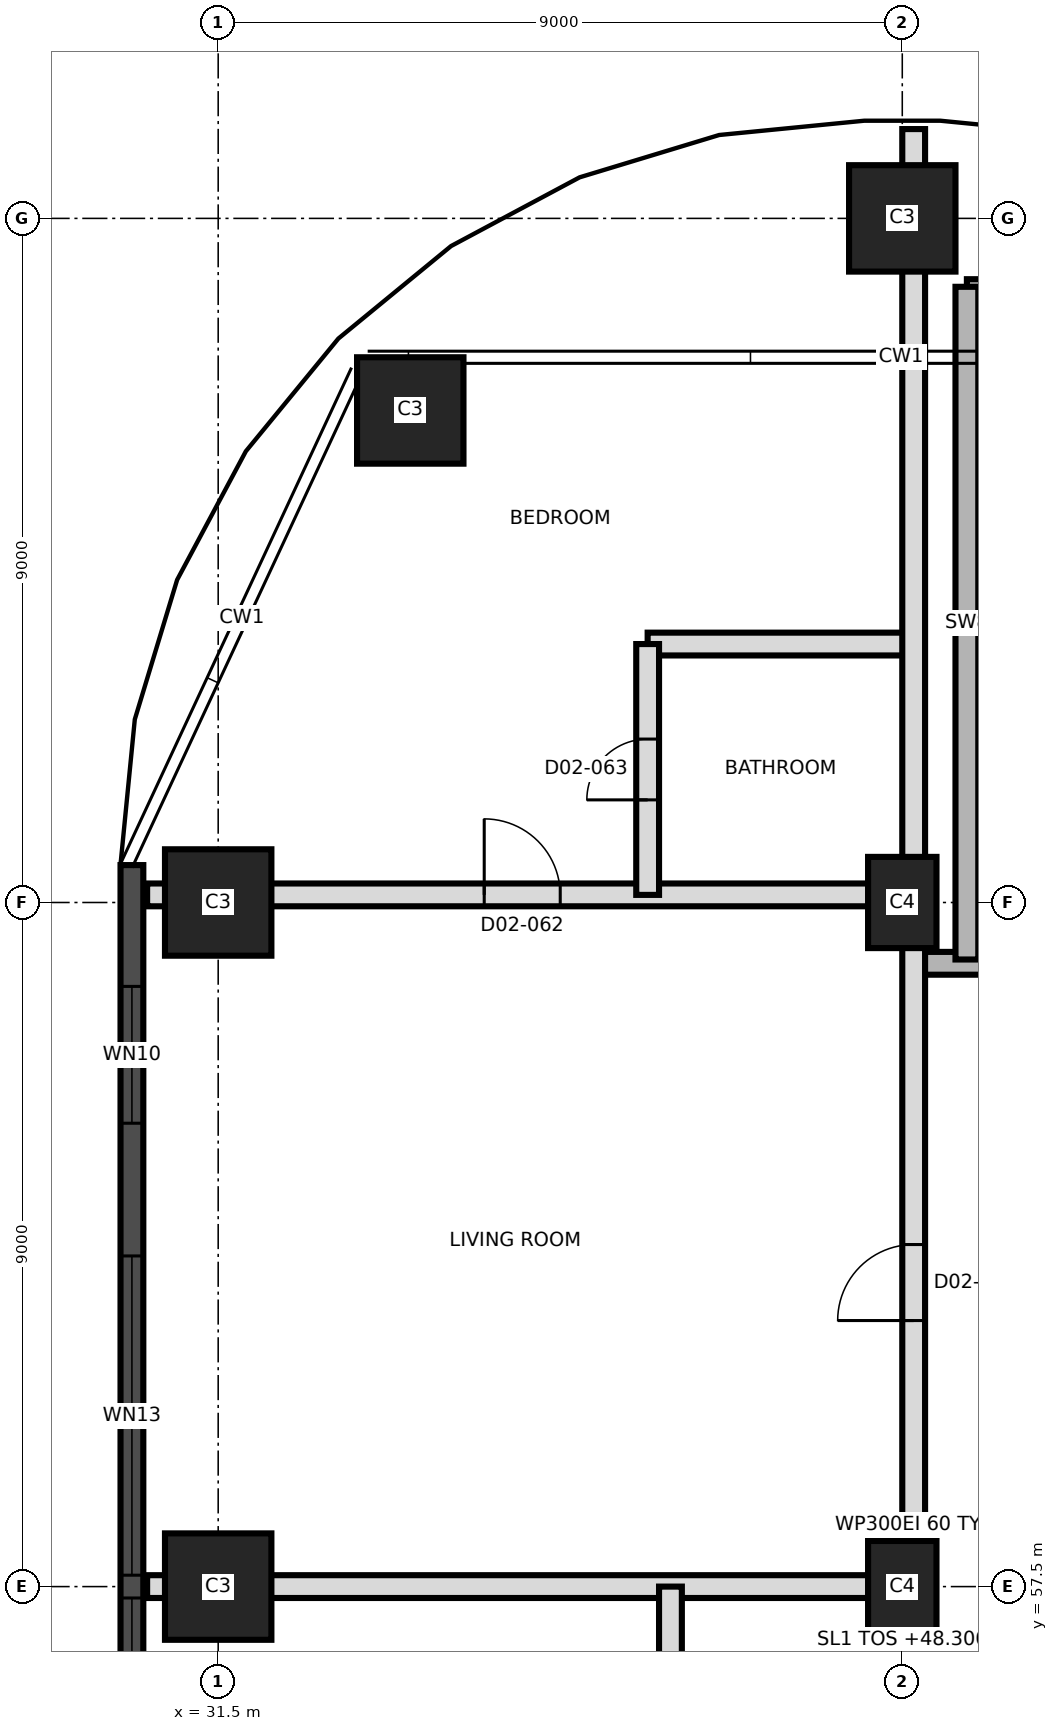
"""IFC4 building model, lengths in metres.
Left out: names, types, materials, properties, quantities, classifications, styles, units other than length and angle.
Written with IfcOpenShell. Run it as: python <this file> out.ifc"""

import sys

from ifc_helpers import new_model, si_unit, direction, frame, frame_2d, origin, origin_2d, place, context, subcontext, project, spatial, rectangle, extrude, element, fill, save


model = new_model("IFC4")
c1 = context("Model", 3, precision=1e-05, world=origin(), true_north=direction((0.0, 1.0)))
c2 = subcontext(c1, "Body", "Model", "MODEL_VIEW")
j1 = project(units=[si_unit("LENGTHUNIT", "METRE"), si_unit("PLANEANGLEUNIT", "RADIAN")], contexts=[c1])
p1 = place(None, origin())
s1 = spatial("IfcSite", under=j1, at=p1, CompositionType="ELEMENT")
p2 = place(p1, origin())
s2 = spatial("IfcBuilding", under=s1, at=p2, CompositionType="ELEMENT")
p3 = place(p2, frame((0.0, 0.0, 48.3)))
s3 = spatial("IfcBuildingStorey", under=s2, at=p3, CompositionType="ELEMENT", Elevation=48.3)
p4 = place(p3, frame((31.5, 57.5, 0.0), z_axis=(0.0, 0.0, 1.0), x_axis=(1.0, 0.0, 0.0)))
e1 = element("IfcColumn", 1, at=p4, inside=s3, PredefinedType="COLUMN", context=c2, shape_type="SweptSolid", body=[
    extrude(rectangle(XDim=1.4, YDim=1.4, at=origin_2d()), origin(), (0.0, 0.0, 1.0), 3.7),
])
p5 = place(p3, frame((40.5, 57.5, 0.0), z_axis=(0.0, 0.0, 1.0), x_axis=(0.0, 1.0, 0.0)))
e2 = element("IfcColumn", 2, at=p5, inside=s3, PredefinedType="COLUMN", context=c2, shape_type="SweptSolid", body=[
    extrude(rectangle(XDim=1.2, YDim=0.9, at=origin_2d()), origin(), (0.0, 0.0, 1.0), 3.7),
])
p6 = place(p3, frame((31.5, 66.5, 0.0), z_axis=(0.0, 0.0, 1.0), x_axis=(1.0, 0.0, 0.0)))
e3 = element("IfcColumn", 3, at=p6, inside=s3, PredefinedType="COLUMN", context=c2, shape_type="SweptSolid", body=[
    extrude(rectangle(XDim=1.4, YDim=1.4, at=origin_2d()), origin(), (0.0, 0.0, 1.0), 3.7),
])
p7 = place(p3, frame((40.5, 66.5, 0.0), z_axis=(0.0, 0.0, 1.0), x_axis=(0.0, 1.0, 0.0)))
e4 = element("IfcColumn", 4, at=p7, inside=s3, PredefinedType="COLUMN", context=c2, shape_type="SweptSolid", body=[
    extrude(rectangle(XDim=1.2, YDim=0.9, at=origin_2d()), origin(), (0.0, 0.0, 1.0), 3.7),
])
for number, where, z_axis, x_axis in (
    (5, (34.027, 72.973, 0.0), (0.0, 0.0, 1.0), (1.0, 0.0, 0.0)),
    (6, (40.5, 75.5, 0.0), (0.0, 0.0, 1.0), (1.0, 0.0, 0.0)),
):
    element("IfcColumn", number, at=place(p3, frame(where, z_axis=z_axis, x_axis=x_axis)), inside=s3, PredefinedType="COLUMN", context=c2, shape_type="SweptSolid", body=[
        extrude(rectangle(XDim=1.4, YDim=1.4, at=origin_2d()), origin(), (0.0, 0.0, 1.0), 3.7),
    ])
p8 = place(p3, frame((30.365, 66.992, 0.0), z_axis=(0.0, 0.0, 1.0), x_axis=(0.0, -1.0, 0.0)))
e7 = element("IfcWall", 7, at=p8, inside=s3, PredefinedType="SOLIDWALL", context=c2, shape_type="SweptSolid", body=[
    extrude(rectangle(XDim=32.981, YDim=0.3, at=frame_2d((16.491, 0.0))), origin(), (0.0, 0.0, 1.0), 3.4),
])
p9 = place(p8, frame((1.596, 0.0, 0.3)))
e8 = element("IfcOpeningElement", 8, at=p9, cuts=e7, PredefinedType="OPENING", context=c2, shape_type="SweptSolid", body=[
    extrude(rectangle(XDim=1.8, YDim=2.4, at=frame_2d((0.9, 1.2))), frame((0.0, 0.16, 0.0), z_axis=(0.0, -1.0, 0.0), x_axis=(1.0, 0.0, 0.0)), (0.0, 0.0, 1.0), 0.32),
])
p10 = place(p8, frame((5.142, 0.0, 0.9)))
e9 = element("IfcOpeningElement", 9, at=p10, cuts=e7, PredefinedType="OPENING", context=c2, shape_type="SweptSolid", body=[
    extrude(rectangle(XDim=4.2, YDim=1.7, at=frame_2d((2.1, 0.85))), frame((0.0, 0.16, 0.0), z_axis=(0.0, -1.0, 0.0), x_axis=(1.0, 0.0, 0.0)), (0.0, 0.0, 1.0), 0.32),
])
p11 = place(p8, frame((9.642, 0.0, 0.9)))
e10 = element("IfcOpeningElement", 10, at=p11, cuts=e7, PredefinedType="OPENING", context=c2, shape_type="SweptSolid", body=[
    extrude(rectangle(XDim=4.2, YDim=1.7, at=frame_2d((2.1, 0.85))), frame((0.0, 0.16, 0.0), z_axis=(0.0, -1.0, 0.0), x_axis=(1.0, 0.0, 0.0)), (0.0, 0.0, 1.0), 0.32),
])
p12 = place(p8, frame((14.142, 0.0, 0.9)))
e11 = element("IfcOpeningElement", 11, at=p12, cuts=e7, PredefinedType="OPENING", context=c2, shape_type="SweptSolid", body=[
    extrude(rectangle(XDim=4.2, YDim=1.7, at=frame_2d((2.1, 0.85))), frame((0.0, 0.16, 0.0), z_axis=(0.0, -1.0, 0.0), x_axis=(1.0, 0.0, 0.0)), (0.0, 0.0, 1.0), 0.32),
])
p13 = place(p8, frame((18.642, 0.0, 0.9)))
e12 = element("IfcOpeningElement", 12, at=p13, cuts=e7, PredefinedType="OPENING", context=c2, shape_type="SweptSolid", body=[
    extrude(rectangle(XDim=4.2, YDim=1.7, at=frame_2d((2.1, 0.85))), frame((0.0, 0.16, 0.0), z_axis=(0.0, -1.0, 0.0), x_axis=(1.0, 0.0, 0.0)), (0.0, 0.0, 1.0), 0.32),
])
p14 = place(p8, frame((23.142, 0.0, 0.9)))
e13 = element("IfcOpeningElement", 13, at=p14, cuts=e7, PredefinedType="OPENING", context=c2, shape_type="SweptSolid", body=[
    extrude(rectangle(XDim=4.2, YDim=1.7, at=frame_2d((2.1, 0.85))), frame((0.0, 0.16, 0.0), z_axis=(0.0, -1.0, 0.0), x_axis=(1.0, 0.0, 0.0)), (0.0, 0.0, 1.0), 0.32),
])
p15 = place(p8, frame((29.337, 0.0, 0.3)))
e14 = element("IfcOpeningElement", 14, at=p15, cuts=e7, PredefinedType="OPENING", context=c2, shape_type="SweptSolid", body=[
    extrude(rectangle(XDim=1.8, YDim=2.4, at=frame_2d((0.9, 1.2))), frame((0.0, 0.16, 0.0), z_axis=(0.0, -1.0, 0.0), x_axis=(1.0, 0.0, 0.0)), (0.0, 0.0, 1.0), 0.32),
])
p16 = place(p3, frame((30.565, 57.5, 0.0), z_axis=(0.0, 0.0, 1.0), x_axis=(1.0, 0.0, 0.0)))
e15 = element("IfcWall", 15, at=p16, inside=s3, PredefinedType="PARTITIONING", context=c2, shape_type="SweptSolid", body=[
    extrude(rectangle(XDim=10.085, YDim=0.3, at=frame_2d((5.042, 0.0))), origin(), (0.0, 0.0, 1.0), 3.4),
])
p17 = place(p3, frame((40.65, 65.7, 0.0), z_axis=(0.0, 0.0, 1.0), x_axis=(1.0, 0.0, 0.0)))
e16 = element("IfcWall", 16, at=p17, inside=s3, PredefinedType="SHEAR", context=c2, shape_type="SweptSolid", body=[
    extrude(rectangle(XDim=6.2, YDim=0.3, at=frame_2d((3.1, 0.0))), origin(), (0.0, 0.0, 1.0), 3.4),
])
p18 = place(p17, frame((1.1, 0.0, 0.0)))
e17 = element("IfcOpeningElement", 17, at=p18, cuts=e16, PredefinedType="OPENING", context=c2, shape_type="SweptSolid", body=[
    extrude(rectangle(XDim=1.2, YDim=2.1, at=frame_2d((0.6, 1.05))), frame((0.0, 0.16, 0.0), z_axis=(0.0, -1.0, 0.0), x_axis=(1.0, 0.0, 0.0)), (0.0, 0.0, 1.0), 0.32),
])
p19 = place(p3, frame((30.565, 66.6, 0.0), z_axis=(0.0, 0.0, 1.0), x_axis=(1.0, 0.0, 0.0)))
e18 = element("IfcWall", 18, at=p19, inside=s3, PredefinedType="PARTITIONING", context=c2, shape_type="SweptSolid", body=[
    extrude(rectangle(XDim=10.085, YDim=0.3, at=frame_2d((5.042, 0.0))), origin(), (0.0, 0.0, 1.0), 3.4),
])
p20 = place(p19, frame((4.435, 0.0, 0.0)))
e19 = element("IfcOpeningElement", 19, at=p20, cuts=e18, PredefinedType="OPENING", context=c2, shape_type="SweptSolid", body=[
    extrude(rectangle(XDim=1.0, YDim=2.1, at=frame_2d((0.5, 1.05))), frame((0.0, 0.16, 0.0), z_axis=(0.0, -1.0, 0.0), x_axis=(1.0, 0.0, 0.0)), (0.0, 0.0, 1.0), 0.32),
])
p21 = place(p3, frame((37.15, 69.9, 0.0), z_axis=(0.0, 0.0, 1.0), x_axis=(1.0, 0.0, 0.0)))
e20 = element("IfcWall", 20, at=p21, inside=s3, PredefinedType="PARTITIONING", context=c2, shape_type="SweptSolid", body=[
    extrude(rectangle(XDim=3.5, YDim=0.3, at=frame_2d((1.75, 0.0))), origin(), (0.0, 0.0, 1.0), 3.4),
])
p22 = place(p3, frame((41.35, 74.55, 0.0), z_axis=(0.0, 0.0, 1.0), x_axis=(1.0, 0.0, 0.0)))
e21 = element("IfcWall", 21, at=p22, inside=s3, PredefinedType="SHEAR", context=c2, shape_type="SweptSolid", body=[
    extrude(rectangle(XDim=3.0, YDim=0.3, at=frame_2d((1.5, 0.0))), origin(), (0.0, 0.0, 1.0), 3.4),
])
p23 = place(p3, frame((37.15, 66.6, 0.0), z_axis=(0.0, 0.0, 1.0), x_axis=(0.0, 1.0, 0.0)))
e22 = element("IfcWall", 22, at=p23, inside=s3, PredefinedType="PARTITIONING", context=c2, shape_type="SweptSolid", body=[
    extrude(rectangle(XDim=3.3, YDim=0.3, at=frame_2d((1.65, 0.0))), origin(), (0.0, 0.0, 1.0), 3.4),
])
p24 = place(p23, frame((1.25, 0.0, 0.0)))
e23 = element("IfcOpeningElement", 23, at=p24, cuts=e22, PredefinedType="OPENING", context=c2, shape_type="SweptSolid", body=[
    extrude(rectangle(XDim=0.8, YDim=2.1, at=frame_2d((0.4, 1.05))), frame((0.0, 0.16, 0.0), z_axis=(0.0, -1.0, 0.0), x_axis=(1.0, 0.0, 0.0)), (0.0, 0.0, 1.0), 0.32),
])
p25 = place(p3, frame((37.45, 54.8, 0.0), z_axis=(0.0, 0.0, 1.0), x_axis=(0.0, 1.0, 0.0)))
e24 = element("IfcWall", 24, at=p25, inside=s3, PredefinedType="PARTITIONING", context=c2, shape_type="SweptSolid", body=[
    extrude(rectangle(XDim=2.7, YDim=0.3, at=frame_2d((1.35, 0.0))), origin(), (0.0, 0.0, 1.0), 3.4),
])
p26 = place(p25, frame((0.95, 0.0, 0.0)))
e25 = element("IfcOpeningElement", 25, at=p26, cuts=e24, PredefinedType="OPENING", context=c2, shape_type="SweptSolid", body=[
    extrude(rectangle(XDim=0.8, YDim=2.1, at=frame_2d((0.4, 1.05))), frame((0.0, 0.16, 0.0), z_axis=(0.0, -1.0, 0.0), x_axis=(1.0, 0.0, 0.0)), (0.0, 0.0, 1.0), 0.32),
])
p27 = place(p3, frame((40.65, 39.95, 0.0), z_axis=(0.0, 0.0, 1.0), x_axis=(0.0, 1.0, 0.0)))
e26 = element("IfcWall", 26, at=p27, inside=s3, PredefinedType="PARTITIONING", context=c2, shape_type="SweptSolid", body=[
    extrude(rectangle(XDim=36.725, YDim=0.3, at=frame_2d((18.363, 0.0))), origin(), (0.0, 0.0, 1.0), 3.4),
])
p28 = place(p27, frame((0.685, 0.0, 0.0)))
e27 = element("IfcOpeningElement", 27, at=p28, cuts=e26, PredefinedType="OPENING", context=c2, shape_type="SweptSolid", body=[
    extrude(rectangle(XDim=1.2, YDim=2.1, at=frame_2d((0.6, 1.05))), frame((0.0, 0.16, 0.0), z_axis=(0.0, -1.0, 0.0), x_axis=(1.0, 0.0, 0.0)), (0.0, 0.0, 1.0), 0.32),
])
p29 = place(p27, frame((3.935, 0.0, 0.0)))
e28 = element("IfcOpeningElement", 28, at=p29, cuts=e26, PredefinedType="OPENING", context=c2, shape_type="SweptSolid", body=[
    extrude(rectangle(XDim=1.0, YDim=2.1, at=frame_2d((0.5, 1.05))), frame((0.0, 0.16, 0.0), z_axis=(0.0, -1.0, 0.0), x_axis=(1.0, 0.0, 0.0)), (0.0, 0.0, 1.0), 0.32),
])
p30 = place(p27, frame((11.83, 0.0, 0.0)))
e29 = element("IfcOpeningElement", 29, at=p30, cuts=e26, PredefinedType="OPENING", context=c2, shape_type="SweptSolid", body=[
    extrude(rectangle(XDim=1.0, YDim=2.1, at=frame_2d((0.5, 1.05))), frame((0.0, 0.16, 0.0), z_axis=(0.0, -1.0, 0.0), x_axis=(1.0, 0.0, 0.0)), (0.0, 0.0, 1.0), 0.32),
])
p31 = place(p27, frame((13.63, 0.0, 0.0)))
e30 = element("IfcOpeningElement", 30, at=p31, cuts=e26, PredefinedType="OPENING", context=c2, shape_type="SweptSolid", body=[
    extrude(rectangle(XDim=1.0, YDim=2.1, at=frame_2d((0.5, 1.05))), frame((0.0, 0.16, 0.0), z_axis=(0.0, -1.0, 0.0), x_axis=(1.0, 0.0, 0.0)), (0.0, 0.0, 1.0), 0.32),
])
p32 = place(p27, frame((21.05, 0.0, 0.0)))
e31 = element("IfcOpeningElement", 31, at=p32, cuts=e26, PredefinedType="OPENING", context=c2, shape_type="SweptSolid", body=[
    extrude(rectangle(XDim=1.0, YDim=2.4, at=frame_2d((0.5, 1.2))), frame((0.0, 0.16, 0.0), z_axis=(0.0, -1.0, 0.0), x_axis=(1.0, 0.0, 0.0)), (0.0, 0.0, 1.0), 0.32),
])
p33 = place(p3, frame((41.35, 65.75, 0.0), z_axis=(0.0, 0.0, 1.0), x_axis=(0.0, 1.0, 0.0)))
e32 = element("IfcWall", 32, at=p33, inside=s3, PredefinedType="SHEAR", context=c2, shape_type="SweptSolid", body=[
    extrude(rectangle(XDim=8.85, YDim=0.3, at=frame_2d((4.425, 0.0))), origin(), (0.0, 0.0, 1.0), 3.4),
])
p34 = place(p9, origin())
e33 = element("IfcWindow", 33, at=p34, inside=s3, PartitioningType="SINGLE_PANEL", PredefinedType="WINDOW", context=c2, shape_type="SweptSolid", body=[
    extrude(rectangle(XDim=1.8, YDim=2.4, at=frame_2d((0.9, 1.2))), frame((0.0, 0.03, 0.0), z_axis=(0.0, -1.0, 0.0), x_axis=(1.0, 0.0, 0.0)), (0.0, 0.0, 1.0), 0.06),
])
fill(e8, e33)
p35 = place(p10, origin())
e34 = element("IfcWindow", 34, at=p35, inside=s3, PartitioningType="SINGLE_PANEL", PredefinedType="WINDOW", context=c2, shape_type="SweptSolid", body=[
    extrude(rectangle(XDim=4.2, YDim=1.7, at=frame_2d((2.1, 0.85))), frame((0.0, 0.03, 0.0), z_axis=(0.0, -1.0, 0.0), x_axis=(1.0, 0.0, 0.0)), (0.0, 0.0, 1.0), 0.06),
])
fill(e9, e34)
p36 = place(p11, origin())
e35 = element("IfcWindow", 35, at=p36, inside=s3, PartitioningType="SINGLE_PANEL", PredefinedType="WINDOW", context=c2, shape_type="SweptSolid", body=[
    extrude(rectangle(XDim=4.2, YDim=1.7, at=frame_2d((2.1, 0.85))), frame((0.0, 0.03, 0.0), z_axis=(0.0, -1.0, 0.0), x_axis=(1.0, 0.0, 0.0)), (0.0, 0.0, 1.0), 0.06),
])
fill(e10, e35)
p37 = place(p32, origin())
e36 = element("IfcDoor", 36, at=p37, inside=s3, OperationType="SINGLE_SWING_RIGHT", PredefinedType="DOOR", context=c2, shape_type="SweptSolid", body=[
    extrude(rectangle(XDim=1.0, YDim=2.4, at=frame_2d((0.5, 1.2))), frame((0.0, 0.025, 0.0), z_axis=(0.0, -1.0, 0.0), x_axis=(1.0, 0.0, 0.0)), (0.0, 0.0, 1.0), 0.05),
])
fill(e31, e36)
p38 = place(p20, origin())
e37 = element("IfcDoor", 37, at=p38, inside=s3, OperationType="SINGLE_SWING_LEFT", PredefinedType="DOOR", context=c2, shape_type="SweptSolid", body=[
    extrude(rectangle(XDim=1.0, YDim=2.1, at=frame_2d((0.5, 1.05))), frame((0.0, 0.025, 0.0), z_axis=(0.0, -1.0, 0.0), x_axis=(1.0, 0.0, 0.0)), (0.0, 0.0, 1.0), 0.05),
])
fill(e19, e37)
p39 = place(p24, origin())
e38 = element("IfcDoor", 38, at=p39, inside=s3, OperationType="SINGLE_SWING_LEFT", PredefinedType="DOOR", context=c2, shape_type="SweptSolid", body=[
    extrude(rectangle(XDim=0.8, YDim=2.1, at=frame_2d((0.4, 1.05))), frame((0.0, 0.025, 0.0), z_axis=(0.0, -1.0, 0.0), x_axis=(1.0, 0.0, 0.0)), (0.0, 0.0, 1.0), 0.05),
])
fill(e23, e38)
save(model, sys.argv[1])
